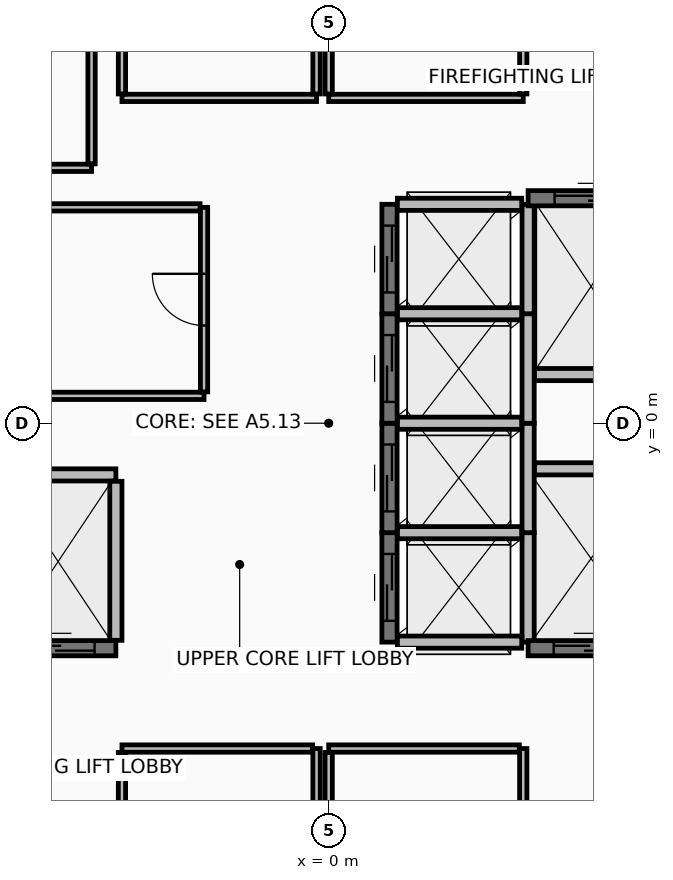
"""IFC4 building model, lengths in metres.
Left out: names, types, materials, properties, quantities, classifications, styles, units other than length and angle.
Written with IfcOpenShell. Run it as: python <this file> out.ifc"""

import sys

from ifc_helpers import new_model, si_unit, direction, frame, frame_2d, origin, place, context, subcontext, project, spatial, rectangle, extrude, element, fill, save


model = new_model("IFC4")
c1 = context("Model", 3, precision=1e-05, world=origin(), true_north=direction((0.0, 1.0)))
c2 = subcontext(c1, "Body", "Model", "MODEL_VIEW")
j1 = project(units=[si_unit("LENGTHUNIT", "METRE"), si_unit("PLANEANGLEUNIT", "RADIAN")], contexts=[c1])
p1 = place(None, origin())
s1 = spatial("IfcSite", under=j1, at=p1, CompositionType="ELEMENT")
p2 = place(p1, origin())
s2 = spatial("IfcBuilding", under=s1, at=p2, CompositionType="ELEMENT")
p3 = place(p2, frame((0.0, 0.0, 302.15)))
s3 = spatial("IfcBuildingStorey", under=s2, at=p3, CompositionType="ELEMENT", Elevation=302.15)
p4 = place(p3, frame((1.0, -3.6, 0.0), z_axis=(0.0, 0.0, 1.0), x_axis=(0.0, 1.0, 0.0)))
e1 = element("IfcWall", 1, at=p4, inside=s3, PredefinedType="SHEAR", context=c2, shape_type="SweptSolid", body=[
    extrude(rectangle(XDim=1.8, YDim=0.25, at=frame_2d((0.9, 0.0))), origin(), (0.0, 0.0, 1.0), 3.95),
])
p5 = place(p4, frame((0.35, 0.0, 0.0)))
e2 = element("IfcOpeningElement", 2, at=p5, cuts=e1, PredefinedType="OPENING", context=c2, shape_type="SweptSolid", body=[
    extrude(rectangle(XDim=1.1, YDim=2.2, at=frame_2d((0.55, 1.1))), frame((0.0, 0.135, 0.0), z_axis=(0.0, -1.0, 0.0), x_axis=(1.0, 0.0, 0.0)), (0.0, 0.0, 1.0), 0.27),
])
p6 = place(p3, frame((3.28, -3.6, 0.0), z_axis=(0.0, 0.0, 1.0), x_axis=(0.0, 1.0, 0.0)))
e3 = element("IfcWall", 3, at=p6, inside=s3, PredefinedType="PARTITIONING", context=c2, shape_type="SweptSolid", body=[
    extrude(rectangle(XDim=1.8, YDim=0.2, at=frame_2d((0.9, 0.0))), origin(), (0.0, 0.0, 1.0), 3.95),
])
for number, where, z_axis, x_axis in (
    (4, (1.13, -3.6, 0.0), (0.0, 0.0, 1.0), (1.0, 0.0, 0.0)),
    (5, (1.13, -1.8, 0.0), (0.0, 0.0, 1.0), (1.0, 0.0, 0.0)),
):
    element("IfcWall", number, at=place(p3, frame(where, z_axis=z_axis, x_axis=x_axis)), inside=s3, PredefinedType="PARTITIONING", context=c2, shape_type="SweptSolid", body=[
        extrude(rectangle(XDim=2.045, YDim=0.2, at=frame_2d((1.022, 0.0))), origin(), (0.0, 0.0, 1.0), 3.95),
    ])
p7 = place(p3, frame((1.0, -1.8, 0.0), z_axis=(0.0, 0.0, 1.0), x_axis=(0.0, 1.0, 0.0)))
e6 = element("IfcWall", 6, at=p7, inside=s3, PredefinedType="SHEAR", context=c2, shape_type="SweptSolid", body=[
    extrude(rectangle(XDim=1.8, YDim=0.25, at=frame_2d((0.9, 0.0))), origin(), (0.0, 0.0, 1.0), 3.95),
])
p8 = place(p7, frame((0.35, 0.0, 0.0)))
e7 = element("IfcOpeningElement", 7, at=p8, cuts=e6, PredefinedType="OPENING", context=c2, shape_type="SweptSolid", body=[
    extrude(rectangle(XDim=1.1, YDim=2.2, at=frame_2d((0.55, 1.1))), frame((0.0, 0.135, 0.0), z_axis=(0.0, -1.0, 0.0), x_axis=(1.0, 0.0, 0.0)), (0.0, 0.0, 1.0), 0.27),
])
p9 = place(p3, frame((3.28, -1.8, 0.0), z_axis=(0.0, 0.0, 1.0), x_axis=(0.0, 1.0, 0.0)))
e8 = element("IfcWall", 8, at=p9, inside=s3, PredefinedType="PARTITIONING", context=c2, shape_type="SweptSolid", body=[
    extrude(rectangle(XDim=1.8, YDim=0.2, at=frame_2d((0.9, 0.0))), origin(), (0.0, 0.0, 1.0), 3.95),
])
p10 = place(p3, frame((1.13, 0.0, 0.0), z_axis=(0.0, 0.0, 1.0), x_axis=(1.0, 0.0, 0.0)))
e9 = element("IfcWall", 9, at=p10, inside=s3, PredefinedType="PARTITIONING", context=c2, shape_type="SweptSolid", body=[
    extrude(rectangle(XDim=2.045, YDim=0.2, at=frame_2d((1.022, 0.0))), origin(), (0.0, 0.0, 1.0), 3.95),
])
p11 = place(p3, frame((1.0, 0.0, 0.0), z_axis=(0.0, 0.0, 1.0), x_axis=(0.0, 1.0, 0.0)))
e10 = element("IfcWall", 10, at=p11, inside=s3, PredefinedType="SHEAR", context=c2, shape_type="SweptSolid", body=[
    extrude(rectangle(XDim=1.8, YDim=0.25, at=frame_2d((0.9, 0.0))), origin(), (0.0, 0.0, 1.0), 3.95),
])
p12 = place(p11, frame((0.35, 0.0, 0.0)))
e11 = element("IfcOpeningElement", 11, at=p12, cuts=e10, PredefinedType="OPENING", context=c2, shape_type="SweptSolid", body=[
    extrude(rectangle(XDim=1.1, YDim=2.2, at=frame_2d((0.55, 1.1))), frame((0.0, 0.135, 0.0), z_axis=(0.0, -1.0, 0.0), x_axis=(1.0, 0.0, 0.0)), (0.0, 0.0, 1.0), 0.27),
])
p13 = place(p3, frame((3.28, 0.0, 0.0), z_axis=(0.0, 0.0, 1.0), x_axis=(0.0, 1.0, 0.0)))
e12 = element("IfcWall", 12, at=p13, inside=s3, PredefinedType="PARTITIONING", context=c2, shape_type="SweptSolid", body=[
    extrude(rectangle(XDim=1.8, YDim=0.2, at=frame_2d((0.9, 0.0))), origin(), (0.0, 0.0, 1.0), 3.95),
])
p14 = place(p3, frame((1.13, 1.8, 0.0), z_axis=(0.0, 0.0, 1.0), x_axis=(1.0, 0.0, 0.0)))
e13 = element("IfcWall", 13, at=p14, inside=s3, PredefinedType="PARTITIONING", context=c2, shape_type="SweptSolid", body=[
    extrude(rectangle(XDim=2.045, YDim=0.2, at=frame_2d((1.022, 0.0))), origin(), (0.0, 0.0, 1.0), 3.95),
])
p15 = place(p3, frame((1.0, 1.8, 0.0), z_axis=(0.0, 0.0, 1.0), x_axis=(0.0, 1.0, 0.0)))
e14 = element("IfcWall", 14, at=p15, inside=s3, PredefinedType="SHEAR", context=c2, shape_type="SweptSolid", body=[
    extrude(rectangle(XDim=1.8, YDim=0.25, at=frame_2d((0.9, 0.0))), origin(), (0.0, 0.0, 1.0), 3.95),
])
p16 = place(p15, frame((0.35, 0.0, 0.0)))
e15 = element("IfcOpeningElement", 15, at=p16, cuts=e14, PredefinedType="OPENING", context=c2, shape_type="SweptSolid", body=[
    extrude(rectangle(XDim=1.1, YDim=2.2, at=frame_2d((0.55, 1.1))), frame((0.0, 0.135, 0.0), z_axis=(0.0, -1.0, 0.0), x_axis=(1.0, 0.0, 0.0)), (0.0, 0.0, 1.0), 0.27),
])
p17 = place(p3, frame((3.28, 1.8, 0.0), z_axis=(0.0, 0.0, 1.0), x_axis=(0.0, 1.0, 0.0)))
e16 = element("IfcWall", 16, at=p17, inside=s3, PredefinedType="PARTITIONING", context=c2, shape_type="SweptSolid", body=[
    extrude(rectangle(XDim=1.8, YDim=0.2, at=frame_2d((0.9, 0.0))), origin(), (0.0, 0.0, 1.0), 3.95),
])
p18 = place(p3, frame((1.13, 3.6, 0.0), z_axis=(0.0, 0.0, 1.0), x_axis=(1.0, 0.0, 0.0)))
e17 = element("IfcWall", 17, at=p18, inside=s3, PredefinedType="PARTITIONING", context=c2, shape_type="SweptSolid", body=[
    extrude(rectangle(XDim=2.045, YDim=0.2, at=frame_2d((1.022, 0.0))), origin(), (0.0, 0.0, 1.0), 3.245),
])
p19 = place(p3, frame((-5.4, -3.7, 0.0), z_axis=(0.0, 0.0, 1.0), x_axis=(1.0, 0.0, 0.0)))
e18 = element("IfcWall", 18, at=p19, inside=s3, PredefinedType="SHEAR", context=c2, shape_type="SweptSolid", body=[
    extrude(rectangle(XDim=1.9, YDim=0.25, at=frame_2d((0.95, 0.0))), origin(), (0.0, 0.0, 1.0), 3.95),
])
p20 = place(p19, frame((0.35, 0.0, 0.0)))
e19 = element("IfcOpeningElement", 19, at=p20, cuts=e18, PredefinedType="OPENING", context=c2, shape_type="SweptSolid", body=[
    extrude(rectangle(XDim=1.2, YDim=2.2, at=frame_2d((0.6, 1.1))), frame((0.0, 0.135, 0.0), z_axis=(0.0, -1.0, 0.0), x_axis=(1.0, 0.0, 0.0)), (0.0, 0.0, 1.0), 0.27),
])
p21 = place(p3, frame((-5.27, -0.85, 0.0), z_axis=(0.0, 0.0, 1.0), x_axis=(1.0, 0.0, 0.0)))
e20 = element("IfcWall", 20, at=p21, inside=s3, PredefinedType="PARTITIONING", context=c2, shape_type="SweptSolid", body=[
    extrude(rectangle(XDim=1.77, YDim=0.2, at=frame_2d((0.885, 0.0))), origin(), (0.0, 0.0, 1.0), 3.95),
])
p22 = place(p3, frame((-3.5, -3.57, 0.0), z_axis=(0.0, 0.0, 1.0), x_axis=(0.0, 1.0, 0.0)))
e21 = element("IfcWall", 21, at=p22, inside=s3, PredefinedType="PARTITIONING", context=c2, shape_type="SweptSolid", body=[
    extrude(rectangle(XDim=2.615, YDim=0.2, at=frame_2d((1.308, 0.0))), origin(), (0.0, 0.0, 1.0), 3.95),
])
p23 = place(p3, frame((3.28, 3.7, 0.0), z_axis=(0.0, 0.0, 1.0), x_axis=(1.0, 0.0, 0.0)))
e22 = element("IfcWall", 22, at=p23, inside=s3, PredefinedType="SHEAR", context=c2, shape_type="SweptSolid", body=[
    extrude(rectangle(XDim=2.07, YDim=0.25, at=frame_2d((1.035, 0.0))), origin(), (0.0, 0.0, 1.0), 3.95),
])
p24 = place(p23, frame((0.435, 0.0, 0.0)))
e23 = element("IfcOpeningElement", 23, at=p24, cuts=e22, PredefinedType="OPENING", context=c2, shape_type="SweptSolid", body=[
    extrude(rectangle(XDim=1.2, YDim=2.2, at=frame_2d((0.6, 1.1))), frame((0.0, 0.135, 0.0), z_axis=(0.0, -1.0, 0.0), x_axis=(1.0, 0.0, 0.0)), (0.0, 0.0, 1.0), 0.27),
])
p25 = place(p3, frame((3.385, 0.8, 0.0), z_axis=(0.0, 0.0, 1.0), x_axis=(1.0, 0.0, 0.0)))
e24 = element("IfcWall", 24, at=p25, inside=s3, PredefinedType="PARTITIONING", context=c2, shape_type="SweptSolid", body=[
    extrude(rectangle(XDim=1.835, YDim=0.2, at=frame_2d((0.917, 0.0))), origin(), (0.0, 0.0, 1.0), 3.95),
])
p26 = place(p3, frame((3.28, -3.7, 0.0), z_axis=(0.0, 0.0, 1.0), x_axis=(1.0, 0.0, 0.0)))
e25 = element("IfcWall", 25, at=p26, inside=s3, PredefinedType="SHEAR", context=c2, shape_type="SweptSolid", body=[
    extrude(rectangle(XDim=1.94, YDim=0.25, at=frame_2d((0.97, 0.0))), origin(), (0.0, 0.0, 1.0), 3.95),
])
p27 = place(p26, frame((0.42, 0.0, 0.0)))
e26 = element("IfcOpeningElement", 26, at=p27, cuts=e25, PredefinedType="OPENING", context=c2, shape_type="SweptSolid", body=[
    extrude(rectangle(XDim=1.1, YDim=2.2, at=frame_2d((0.55, 1.1))), frame((0.0, 0.135, 0.0), z_axis=(0.0, -1.0, 0.0), x_axis=(1.0, 0.0, 0.0)), (0.0, 0.0, 1.0), 0.27),
])
p28 = place(p3, frame((3.385, -0.75, 0.0), z_axis=(0.0, 0.0, 1.0), x_axis=(1.0, 0.0, 0.0)))
e27 = element("IfcWall", 27, at=p28, inside=s3, PredefinedType="PARTITIONING", context=c2, shape_type="SweptSolid", body=[
    extrude(rectangle(XDim=1.835, YDim=0.2, at=frame_2d((0.917, 0.0))), origin(), (0.0, 0.0, 1.0), 3.95),
])
p29 = place(p3, frame((-5.22, 0.45, 0.0), z_axis=(0.0, 0.0, 1.0), x_axis=(1.0, 0.0, 0.0)))
e28 = element("IfcWall", 28, at=p29, inside=s3, PredefinedType="PARTITIONING", context=c2, shape_type="SweptSolid", body=[
    extrude(rectangle(XDim=3.17, YDim=0.12, at=frame_2d((1.585, 0.0))), origin(), (0.0, 0.0, 1.0), 3.95),
])
p30 = place(p3, frame((-2.05, 0.515, 0.0), z_axis=(0.0, 0.0, 1.0), x_axis=(0.0, 1.0, 0.0)))
e29 = element("IfcWall", 29, at=p30, inside=s3, PredefinedType="PARTITIONING", context=c2, shape_type="SweptSolid", body=[
    extrude(rectangle(XDim=3.035, YDim=0.12, at=frame_2d((1.518, 0.0))), origin(), (0.0, 0.0, 1.0), 3.95),
])
p31 = place(p30, frame((1.092, 0.0, 0.0)))
e30 = element("IfcOpeningElement", 30, at=p31, cuts=e29, PredefinedType="OPENING", context=c2, shape_type="SweptSolid", body=[
    extrude(rectangle(XDim=0.85, YDim=2.1, at=frame_2d((0.425, 1.05))), frame((0.0, 0.07, 0.0), z_axis=(0.0, -1.0, 0.0), x_axis=(1.0, 0.0, 0.0)), (0.0, 0.0, 1.0), 0.14),
])
p32 = place(p3, frame((-2.115, 3.55, 0.0), z_axis=(0.0, 0.0, 1.0), x_axis=(-1.0, 0.0, 0.0)))
e31 = element("IfcWall", 31, at=p32, inside=s3, PredefinedType="PARTITIONING", context=c2, shape_type="SweptSolid", body=[
    extrude(rectangle(XDim=3.105, YDim=0.12, at=frame_2d((1.552, 0.0))), origin(), (0.0, 0.0, 1.0), 3.95),
])
p33 = place(p3, frame((-0.2, -7.42, 0.0), z_axis=(0.0, 0.0, 1.0), x_axis=(0.0, 1.0, 0.0)))
e32 = element("IfcWall", 32, at=p33, inside=s3, PredefinedType="PARTITIONING", context=c2, shape_type="SweptSolid", body=[
    extrude(rectangle(XDim=2.07, YDim=0.12, at=frame_2d((1.035, 0.0))), origin(), (0.0, 0.0, 1.0), 3.245),
])
p34 = place(p3, frame((-0.265, -5.35, 0.0), z_axis=(0.0, 0.0, 1.0), x_axis=(-1.0, 0.0, 0.0)))
e33 = element("IfcWall", 33, at=p34, inside=s3, PredefinedType="PARTITIONING", context=c2, shape_type="SweptSolid", body=[
    extrude(rectangle(XDim=3.135, YDim=0.12, at=frame_2d((1.567, 0.0))), origin(), (0.0, 0.0, 1.0), 3.245),
])
p35 = place(p3, frame((-3.4, -5.415, 0.0), z_axis=(0.0, 0.0, 1.0), x_axis=(0.0, -1.0, 0.0)))
e34 = element("IfcWall", 34, at=p35, inside=s3, PredefinedType="PARTITIONING", context=c2, shape_type="SweptSolid", body=[
    extrude(rectangle(XDim=2.8, YDim=0.12, at=frame_2d((1.4, 0.0))), origin(), (0.0, 0.0, 1.0), 3.245),
])
p36 = place(p3, frame((3.2, -8.215, 0.0), z_axis=(0.0, 0.0, 1.0), x_axis=(0.0, 1.0, 0.0)))
e35 = element("IfcWall", 35, at=p36, inside=s3, PredefinedType="PARTITIONING", context=c2, shape_type="SweptSolid", body=[
    extrude(rectangle(XDim=2.865, YDim=0.12, at=frame_2d((1.433, 0.0))), origin(), (0.0, 0.0, 1.0), 3.245),
])
p37 = place(p3, frame((3.135, -5.35, 0.0), z_axis=(0.0, 0.0, 1.0), x_axis=(-1.0, 0.0, 0.0)))
e36 = element("IfcWall", 36, at=p37, inside=s3, PredefinedType="PARTITIONING", context=c2, shape_type="SweptSolid", body=[
    extrude(rectangle(XDim=3.135, YDim=0.12, at=frame_2d((1.567, 0.0))), origin(), (0.0, 0.0, 1.0), 3.95),
])
p38 = place(p3, frame((0.0, -5.415, 0.0), z_axis=(0.0, 0.0, 1.0), x_axis=(0.0, -1.0, 0.0)))
e37 = element("IfcWall", 37, at=p38, inside=s3, PredefinedType="PARTITIONING", context=c2, shape_type="SweptSolid", body=[
    extrude(rectangle(XDim=2.005, YDim=0.12, at=frame_2d((1.002, 0.0))), origin(), (0.0, 0.0, 1.0), 3.245),
])
p39 = place(p3, frame((-3.4, 5.35, 0.0), z_axis=(0.0, 0.0, 1.0), x_axis=(1.0, 0.0, 0.0)))
e38 = element("IfcWall", 38, at=p39, inside=s3, PredefinedType="PARTITIONING", context=c2, shape_type="SweptSolid", body=[
    extrude(rectangle(XDim=3.2, YDim=0.12, at=frame_2d((1.6, 0.0))), origin(), (0.0, 0.0, 1.0), 3.95),
])
p40 = place(p3, frame((-0.2, 5.415, 0.0), z_axis=(0.0, 0.0, 1.0), x_axis=(0.0, 1.0, 0.0)))
e39 = element("IfcWall", 39, at=p40, inside=s3, PredefinedType="PARTITIONING", context=c2, shape_type="SweptSolid", body=[
    extrude(rectangle(XDim=2.005, YDim=0.12, at=frame_2d((1.002, 0.0))), origin(), (0.0, 0.0, 1.0), 3.245),
])
p41 = place(p3, frame((-3.4, 8.215, 0.0), z_axis=(0.0, 0.0, 1.0), x_axis=(0.0, -1.0, 0.0)))
e40 = element("IfcWall", 40, at=p41, inside=s3, PredefinedType="PARTITIONING", context=c2, shape_type="SweptSolid", body=[
    extrude(rectangle(XDim=2.8, YDim=0.12, at=frame_2d((1.4, 0.0))), origin(), (0.0, 0.0, 1.0), 3.245),
])
p42 = place(p3, frame((0.0, 5.35, 0.0), z_axis=(0.0, 0.0, 1.0), x_axis=(1.0, 0.0, 0.0)))
e41 = element("IfcWall", 41, at=p42, inside=s3, PredefinedType="PARTITIONING", context=c2, shape_type="SweptSolid", body=[
    extrude(rectangle(XDim=3.2, YDim=0.12, at=frame_2d((1.6, 0.0))), origin(), (0.0, 0.0, 1.0), 3.245),
])
p43 = place(p3, frame((3.2, 5.415, 0.0), z_axis=(0.0, 0.0, 1.0), x_axis=(0.0, 1.0, 0.0)))
e42 = element("IfcWall", 42, at=p43, inside=s3, PredefinedType="PARTITIONING", context=c2, shape_type="SweptSolid", body=[
    extrude(rectangle(XDim=2.8, YDim=0.12, at=frame_2d((1.4, 0.0))), origin(), (0.0, 0.0, 1.0), 3.245),
])
p44 = place(p3, frame((0.0, 7.42, 0.0), z_axis=(0.0, 0.0, 1.0), x_axis=(0.0, -1.0, 0.0)))
e43 = element("IfcWall", 43, at=p44, inside=s3, PredefinedType="PARTITIONING", context=c2, shape_type="SweptSolid", body=[
    extrude(rectangle(XDim=2.005, YDim=0.12, at=frame_2d((1.002, 0.0))), origin(), (0.0, 0.0, 1.0), 3.245),
])
p45 = place(p3, frame((-7.8, 4.2, 0.0), z_axis=(0.0, 0.0, 1.0), x_axis=(1.0, 0.0, 0.0)))
e44 = element("IfcWall", 44, at=p45, inside=s3, PredefinedType="PARTITIONING", context=c2, shape_type="SweptSolid", body=[
    extrude(rectangle(XDim=3.9, YDim=0.12, at=frame_2d((1.95, 0.0))), origin(), (0.0, 0.0, 1.0), 3.95),
])
p46 = place(p3, frame((-3.9, 4.265, 0.0), z_axis=(0.0, 0.0, 1.0), x_axis=(0.0, 1.0, 0.0)))
e45 = element("IfcWall", 45, at=p46, inside=s3, PredefinedType="PARTITIONING", context=c2, shape_type="SweptSolid", body=[
    extrude(rectangle(XDim=3.95, YDim=0.12, at=frame_2d((1.975, 0.0))), origin(), (0.0, 0.0, 1.0), 3.245),
])
p47 = place(p5, origin())
e46 = element("IfcDoor", 46, at=p47, inside=s3, OperationType="SLIDING_TO_LEFT", PredefinedType="DOOR", context=c2, shape_type="SweptSolid", body=[
    extrude(rectangle(XDim=1.1, YDim=2.2, at=frame_2d((0.55, 1.1))), frame((0.0, 0.025, 0.0), z_axis=(0.0, -1.0, 0.0), x_axis=(1.0, 0.0, 0.0)), (0.0, 0.0, 1.0), 0.05),
])
fill(e2, e46)
p48 = place(p8, origin())
e47 = element("IfcDoor", 47, at=p48, inside=s3, OperationType="SLIDING_TO_LEFT", PredefinedType="DOOR", context=c2, shape_type="SweptSolid", body=[
    extrude(rectangle(XDim=1.1, YDim=2.2, at=frame_2d((0.55, 1.1))), frame((0.0, 0.025, 0.0), z_axis=(0.0, -1.0, 0.0), x_axis=(1.0, 0.0, 0.0)), (0.0, 0.0, 1.0), 0.05),
])
fill(e7, e47)
p49 = place(p12, origin())
e48 = element("IfcDoor", 48, at=p49, inside=s3, OperationType="SLIDING_TO_LEFT", PredefinedType="DOOR", context=c2, shape_type="SweptSolid", body=[
    extrude(rectangle(XDim=1.1, YDim=2.2, at=frame_2d((0.55, 1.1))), frame((0.0, 0.025, 0.0), z_axis=(0.0, -1.0, 0.0), x_axis=(1.0, 0.0, 0.0)), (0.0, 0.0, 1.0), 0.05),
])
fill(e11, e48)
p50 = place(p16, origin())
e49 = element("IfcDoor", 49, at=p50, inside=s3, OperationType="SLIDING_TO_LEFT", PredefinedType="DOOR", context=c2, shape_type="SweptSolid", body=[
    extrude(rectangle(XDim=1.1, YDim=2.2, at=frame_2d((0.55, 1.1))), frame((0.0, 0.025, 0.0), z_axis=(0.0, -1.0, 0.0), x_axis=(1.0, 0.0, 0.0)), (0.0, 0.0, 1.0), 0.05),
])
fill(e15, e49)
p51 = place(p20, origin())
e50 = element("IfcDoor", 50, at=p51, inside=s3, OperationType="SLIDING_TO_RIGHT", PredefinedType="DOOR", context=c2, shape_type="SweptSolid", body=[
    extrude(rectangle(XDim=1.2, YDim=2.2, at=frame_2d((0.6, 1.1))), frame((0.0, 0.025, 0.0), z_axis=(0.0, -1.0, 0.0), x_axis=(1.0, 0.0, 0.0)), (0.0, 0.0, 1.0), 0.05),
])
fill(e19, e50)
p52 = place(p24, origin())
e51 = element("IfcDoor", 51, at=p52, inside=s3, OperationType="SLIDING_TO_RIGHT", PredefinedType="DOOR", context=c2, shape_type="SweptSolid", body=[
    extrude(rectangle(XDim=1.2, YDim=2.2, at=frame_2d((0.6, 1.1))), frame((0.0, 0.025, 0.0), z_axis=(0.0, -1.0, 0.0), x_axis=(1.0, 0.0, 0.0)), (0.0, 0.0, 1.0), 0.05),
])
fill(e23, e51)
p53 = place(p27, origin())
e52 = element("IfcDoor", 52, at=p53, inside=s3, OperationType="SLIDING_TO_LEFT", PredefinedType="DOOR", context=c2, shape_type="SweptSolid", body=[
    extrude(rectangle(XDim=1.1, YDim=2.2, at=frame_2d((0.55, 1.1))), frame((0.0, 0.025, 0.0), z_axis=(0.0, -1.0, 0.0), x_axis=(1.0, 0.0, 0.0)), (0.0, 0.0, 1.0), 0.05),
])
fill(e26, e52)
p54 = place(p31, frame((0.85, 0.0, 0.0), z_axis=(0.0, 0.0, 1.0), x_axis=(-1.0, 0.0, 0.0)))
e53 = element("IfcDoor", 53, at=p54, inside=s3, OperationType="SINGLE_SWING_RIGHT", PredefinedType="DOOR", context=c2, shape_type="SweptSolid", body=[
    extrude(rectangle(XDim=0.85, YDim=2.1, at=frame_2d((0.425, 1.05))), frame((0.0, 0.025, 0.0), z_axis=(0.0, -1.0, 0.0), x_axis=(1.0, 0.0, 0.0)), (0.0, 0.0, 1.0), 0.05),
])
fill(e30, e53)
save(model, sys.argv[1])
